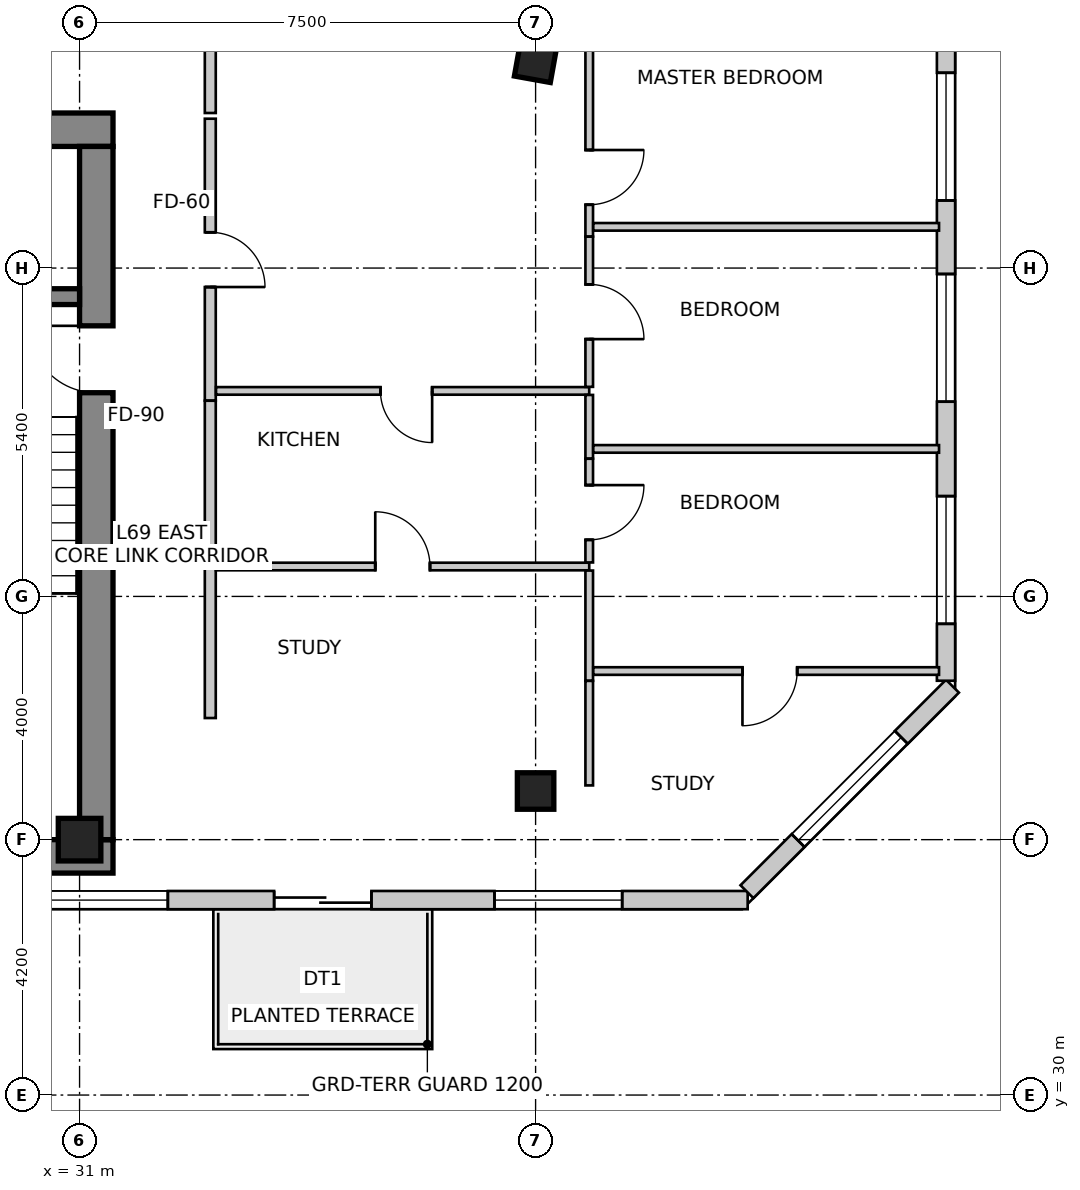
"""IFC4 building model, lengths in metres.
Left out: names, types, materials, properties, quantities, classifications, styles, units other than length and angle.
Written with IfcOpenShell. Run it as: python <this file> out.ifc"""

import sys

from ifc_helpers import new_model, si_unit, direction, frame, frame_2d, origin, origin_2d, place, context, subcontext, project, spatial, rectangle, extrude, source, transform, mapped, element, fill, save


model = new_model("IFC4")
c1 = context("Model", 3, precision=1e-05, world=origin(), true_north=direction((0.0, 1.0)))
c2 = subcontext(c1, "Body", "Model", "MODEL_VIEW")
j1 = project(units=[si_unit("LENGTHUNIT", "METRE"), si_unit("PLANEANGLEUNIT", "RADIAN")], contexts=[c1])
p1 = place(None, origin())
s1 = spatial("IfcSite", under=j1, at=p1, CompositionType="ELEMENT")
p2 = place(p1, origin())
s2 = spatial("IfcBuilding", under=s1, at=p2, CompositionType="ELEMENT")
p3 = place(p2, frame((0.0, 0.0, 270.9)))
s3 = spatial("IfcBuildingStorey", under=s2, at=p3, CompositionType="ELEMENT", Elevation=270.9)
p4 = place(p3, frame((16.05, 45.875, 0.0), z_axis=(0.0, 0.0, 1.0), x_axis=(1.0, 0.0, 0.0)))
e1 = element("IfcWall", 1, at=p4, inside=s3, PredefinedType="SHEAR", context=c2, shape_type="SweptSolid", body=[
    extrude(rectangle(XDim=15.5, YDim=0.55, at=frame_2d((7.75, 0.0))), origin(), (0.0, 0.0, 1.0), 3.6),
])
p5 = place(p3, frame((16.05, 33.925, 0.0), z_axis=(0.0, 0.0, 1.0), x_axis=(1.0, 0.0, 0.0)))
e2 = element("IfcWall", 2, at=p5, inside=s3, PredefinedType="SHEAR", context=c2, shape_type="SweptSolid", body=[
    extrude(rectangle(XDim=15.5, YDim=0.55, at=frame_2d((7.75, 0.0))), origin(), (0.0, 0.0, 1.0), 3.6),
])
m1 = source(origin(), c2, "Body", "SweptSolid", [
    extrude(rectangle(XDim=1.1, YDim=2.15, at=frame_2d((0.55, 1.075))), frame((0.0, 0.285, 0.0), z_axis=(0.0, -1.0, 0.0), x_axis=(1.0, 0.0, 0.0)), (0.0, 0.0, 1.0), 0.57),
])
p6 = place(p5, frame((9.98, 0.0, 0.0)))
e3 = element("IfcOpeningElement", 3, at=p6, cuts=e2, PredefinedType="OPENING", context=c2, shape_type="MappedRepresentation", body=[
    mapped(m1, transform((0.0, 0.0, 0.0), scale=1.0)),
])
p7 = place(p3, frame((31.275, 34.2, 0.0), z_axis=(0.0, 0.0, 1.0), x_axis=(0.0, 1.0, 0.0)))
e4 = element("IfcWall", 4, at=p7, inside=s3, PredefinedType="SHEAR", context=c2, shape_type="SweptSolid", body=[
    extrude(rectangle(XDim=11.4, YDim=0.55, at=frame_2d((5.7, 0.0))), origin(), (0.0, 0.0, 1.0), 3.6),
])
p8 = place(p7, frame((7.35, 0.0, 0.0)))
e5 = element("IfcOpeningElement", 5, at=p8, cuts=e4, PredefinedType="OPENING", context=c2, shape_type="MappedRepresentation", body=[
    mapped(m1, transform((0.0, 0.0, 0.0), scale=1.0)),
])
p9 = place(p3, frame((27.5, 43.13, 0.0), z_axis=(0.0, 0.0, 1.0), x_axis=(1.0, 0.0, 0.0)))
e6 = element("IfcWall", 6, at=p9, inside=s3, PredefinedType="SHEAR", context=c2, shape_type="SweptSolid", body=[
    extrude(rectangle(XDim=3.5, YDim=0.26, at=frame_2d((1.75, 0.0))), origin(), (0.0, 0.0, 1.0), 3.6),
])
m2 = source(origin(), c2, "Body", "SweptSolid", [
    extrude(rectangle(XDim=0.6, YDim=0.6, at=origin_2d()), origin(), (0.0, 0.0, 1.0), 3.6),
])
p10 = place(p3, frame((38.5, 47.0, 0.0), z_axis=(0.0, 0.0, 1.0), x_axis=(0.984195607969, -0.17708474032, 0.0)))
e7 = element("IfcColumn", 7, at=p10, inside=s3, PredefinedType="COLUMN", context=c2, shape_type="MappedRepresentation", body=[
    mapped(m2, transform((0.0, 0.0, 0.0), scale=1.0)),
])
m3 = source(origin(), c2, "Body", "SweptSolid", [
    extrude(rectangle(XDim=0.7, YDim=0.7, at=origin_2d()), origin(), (0.0, 0.0, 1.0), 3.6),
])
p11 = place(p3, frame((31.0, 34.2, 0.0), z_axis=(0.0, 0.0, 1.0), x_axis=(1.0, 0.0, 0.0)))
e8 = element("IfcColumn", 8, at=p11, inside=s3, PredefinedType="COLUMN", context=c2, shape_type="MappedRepresentation", body=[
    mapped(m3, transform((0.0, 0.0, 0.0), scale=1.0)),
])
p12 = place(p3, frame((38.5, 35.0, 0.0), z_axis=(0.0, 0.0, 1.0), x_axis=(1.0, 0.0, 0.0)))
e9 = element("IfcColumn", 9, at=p12, inside=s3, PredefinedType="COLUMN", context=c2, shape_type="MappedRepresentation", body=[
    mapped(m2, transform((0.0, 0.0, 0.0), scale=1.0)),
])
p13 = place(p3, frame((28.565, 33.206, 0.0), z_axis=(0.0, 0.0, 1.0), x_axis=(1.0, 0.0, 0.0)))
e10 = element("IfcWall", 10, at=p13, inside=s3, PredefinedType="SOLIDWALL", context=c2, shape_type="SweptSolid", body=[
    extrude(rectangle(XDim=13.423, YDim=0.3, at=frame_2d((6.711, 0.0))), origin(), (0.0, 0.0, 1.0), 3.35),
])
m4 = source(origin(), c2, "Body", "SweptSolid", [
    extrude(rectangle(XDim=1.6, YDim=2.15, at=frame_2d((0.8, 1.075))), frame((0.0, 0.16, 0.0), z_axis=(0.0, -1.0, 0.0), x_axis=(1.0, 0.0, 0.0)), (0.0, 0.0, 1.0), 0.32),
])
p14 = place(p13, frame((5.635, 0.0, 0.0)))
e11 = element("IfcOpeningElement", 11, at=p14, cuts=e10, PredefinedType="OPENING", context=c2, shape_type="MappedRepresentation", body=[
    mapped(m4, transform((0.0, 0.0, 0.0), scale=1.0)),
])
m5 = source(origin(), c2, "Body", "SweptSolid", [
    extrude(rectangle(XDim=2.1, YDim=2.0, at=frame_2d((1.05, 1.0))), frame((0.0, 0.16, 0.0), z_axis=(0.0, -1.0, 0.0), x_axis=(1.0, 0.0, 0.0)), (0.0, 0.0, 1.0), 0.32),
])
p15 = place(p13, frame((1.787, 0.0, 0.85)))
e12 = element("IfcOpeningElement", 12, at=p15, cuts=e10, PredefinedType="OPENING", context=c2, shape_type="MappedRepresentation", body=[
    mapped(m5, transform((0.0, 0.0, 0.0), scale=1.0)),
])
p16 = place(p13, frame((9.259, 0.0, 0.85)))
e13 = element("IfcOpeningElement", 13, at=p16, cuts=e10, PredefinedType="OPENING", context=c2, shape_type="MappedRepresentation", body=[
    mapped(m5, transform((0.0, 0.0, 0.0), scale=1.0)),
])
p17 = place(p3, frame((41.976, 33.344, 0.0), z_axis=(0.0, 0.0, 1.0), x_axis=(0.707132316343, 0.707081245108, 0.0)))
e14 = element("IfcWall", 14, at=p17, inside=s3, PredefinedType="SOLIDWALL", context=c2, shape_type="SweptSolid", body=[
    extrude(rectangle(XDim=4.78, YDim=0.3, at=frame_2d((2.39, 0.0))), origin(), (0.0, 0.0, 1.0), 3.35),
])
m6 = source(origin(), c2, "Body", "SweptSolid", [
    extrude(rectangle(XDim=2.4, YDim=2.2, at=frame_2d((1.2, 1.1))), frame((0.0, 0.16, 0.0), z_axis=(0.0, -1.0, 0.0), x_axis=(1.0, 0.0, 0.0)), (0.0, 0.0, 1.0), 0.32),
])
p18 = place(p17, frame((1.19, 0.0, 0.85)))
e15 = element("IfcOpeningElement", 15, at=p18, cuts=e14, PredefinedType="OPENING", context=c2, shape_type="MappedRepresentation", body=[
    mapped(m6, transform((0.0, 0.0, 0.0), scale=1.0)),
])
p19 = place(p3, frame((45.25, 36.813, 0.0), z_axis=(0.0, 0.0, 1.0), x_axis=(0.0, 1.0, 0.0)))
e16 = element("IfcWall", 16, at=p19, inside=s3, PredefinedType="SOLIDWALL", context=c2, shape_type="SweptSolid", body=[
    extrude(rectangle(XDim=10.531, YDim=0.3, at=frame_2d((5.265, 0.0))), origin(), (0.0, 0.0, 1.0), 3.35),
])
p20 = place(p19, frame((0.936, 0.0, 0.85)))
e17 = element("IfcOpeningElement", 17, at=p20, cuts=e16, PredefinedType="OPENING", context=c2, shape_type="MappedRepresentation", body=[
    mapped(m5, transform((0.0, 0.0, 0.0), scale=1.0)),
])
p21 = place(p19, frame((4.589, 0.0, 0.85)))
e18 = element("IfcOpeningElement", 18, at=p21, cuts=e16, PredefinedType="OPENING", context=c2, shape_type="MappedRepresentation", body=[
    mapped(m5, transform((0.0, 0.0, 0.0), scale=1.0)),
])
p22 = place(p19, frame((7.898, 0.0, 0.85)))
e19 = element("IfcOpeningElement", 19, at=p22, cuts=e16, PredefinedType="OPENING", context=c2, shape_type="MappedRepresentation", body=[
    mapped(m5, transform((0.0, 0.0, 0.0), scale=1.0)),
])
p23 = place(p3, frame((33.15, 47.606, 0.0), z_axis=(0.0, 0.0, 1.0), x_axis=(0.0, -1.0, 0.0)))
e20 = element("IfcWall", 20, at=p23, inside=s3, PredefinedType="PARTITIONING", context=c2, shape_type="SweptSolid", body=[
    extrude(rectangle(XDim=1.456, YDim=0.18, at=frame_2d((0.728, 0.0))), origin(), (0.0, 0.0, 1.0), 3.35),
])
p24 = place(p3, frame((33.15, 38.852, 0.0), z_axis=(0.0, 0.0, 1.0), x_axis=(0.0, -1.0, 0.0)))
e21 = element("IfcWall", 21, at=p24, inside=s3, PredefinedType="PARTITIONING", context=c2, shape_type="SweptSolid", body=[
    extrude(rectangle(XDim=2.652, YDim=0.18, at=frame_2d((1.326, 0.0))), origin(), (0.0, 0.0, 1.0), 3.35),
])
p25 = place(p3, frame((33.15, 46.056, 0.0), z_axis=(0.0, 0.0, 1.0), x_axis=(0.0, -1.0, 0.0)))
e22 = element("IfcWall", 22, at=p25, inside=s3, PredefinedType="PARTITIONING", context=c2, shape_type="SweptSolid", body=[
    extrude(rectangle(XDim=4.636, YDim=0.18, at=frame_2d((2.318, 0.0))), origin(), (0.0, 0.0, 1.0), 2.788),
])
m7 = source(origin(), c2, "Body", "SweptSolid", [
    extrude(rectangle(XDim=0.9, YDim=2.15, at=frame_2d((0.45, 1.075))), frame((0.0, 0.1, 0.0), z_axis=(0.0, -1.0, 0.0), x_axis=(1.0, 0.0, 0.0)), (0.0, 0.0, 1.0), 0.2),
])
p26 = place(p25, frame((1.868, 0.0, 0.0)))
e23 = element("IfcOpeningElement", 23, at=p26, cuts=e22, PredefinedType="OPENING", context=c2, shape_type="MappedRepresentation", body=[
    mapped(m7, transform((0.0, 0.0, 0.0), scale=1.0)),
])
p27 = place(p3, frame((33.15, 41.418, 0.0), z_axis=(0.0, 0.0, 1.0), x_axis=(0.0, -1.0, 0.0)))
e24 = element("IfcWall", 24, at=p27, inside=s3, PredefinedType="PARTITIONING", context=c2, shape_type="SweptSolid", body=[
    extrude(rectangle(XDim=2.564, YDim=0.18, at=frame_2d((1.282, 0.0))), origin(), (0.0, 0.0, 1.0), 3.35),
])
p28 = place(p3, frame((33.244, 38.692, 0.0), z_axis=(0.0, 0.0, 1.0), x_axis=(1.0, 0.0, 0.0)))
e25 = element("IfcWall", 25, at=p28, inside=s3, PredefinedType="PARTITIONING", context=c2, shape_type="SweptSolid", body=[
    extrude(rectangle(XDim=6.138, YDim=0.125, at=frame_2d((3.069, 0.0))), origin(), (0.0, 0.0, 1.0), 2.935),
])
m8 = source(origin(), c2, "Body", "SweptSolid", [
    extrude(rectangle(XDim=0.9, YDim=2.15, at=frame_2d((0.45, 1.075))), frame((0.0, 0.073, 0.0), z_axis=(0.0, -1.0, 0.0), x_axis=(1.0, 0.0, 0.0)), (0.0, 0.0, 1.0), 0.145),
])
p29 = place(p28, frame((2.619, 0.0, 0.0)))
e26 = element("IfcOpeningElement", 26, at=p29, cuts=e25, PredefinedType="OPENING", context=c2, shape_type="MappedRepresentation", body=[
    mapped(m8, transform((0.0, 0.0, 0.0), scale=1.0)),
])
p30 = place(p3, frame((39.382, 38.625, 0.0), z_axis=(0.0, 0.0, 1.0), x_axis=(0.0, -1.0, 0.0)))
e27 = element("IfcWall", 27, at=p30, inside=s3, PredefinedType="PARTITIONING", context=c2, shape_type="SweptSolid", body=[
    extrude(rectangle(XDim=1.812, YDim=0.125, at=frame_2d((0.906, 0.0))), origin(), (0.0, 0.0, 1.0), 3.35),
])
p31 = place(p3, frame((39.382, 36.811, 0.0), z_axis=(0.0, 0.0, 1.0), x_axis=(0.0, -1.0, 0.0)))
e28 = element("IfcWall", 28, at=p31, inside=s3, PredefinedType="PARTITIONING", context=c2, shape_type="SweptSolid", body=[
    extrude(rectangle(XDim=1.719, YDim=0.125, at=frame_2d((0.859, 0.0))), origin(), (0.0, 0.0, 1.0), 3.35),
])
p32 = place(p3, frame((39.382, 41.58, 0.0), z_axis=(0.0, 0.0, 1.0), x_axis=(-1.0, 0.0, 0.0)))
e29 = element("IfcWall", 29, at=p32, inside=s3, PredefinedType="PARTITIONING", context=c2, shape_type="SweptSolid", body=[
    extrude(rectangle(XDim=6.138, YDim=0.125, at=frame_2d((3.069, 0.0))), origin(), (0.0, 0.0, 1.0), 2.935),
])
m9 = source(origin(), c2, "Body", "SweptSolid", [
    extrude(rectangle(XDim=0.85, YDim=2.15, at=frame_2d((0.425, 1.075))), frame((0.0, 0.073, 0.0), z_axis=(0.0, -1.0, 0.0), x_axis=(1.0, 0.0, 0.0)), (0.0, 0.0, 1.0), 0.145),
])
p33 = place(p32, frame((2.583, 0.0, 0.0)))
e30 = element("IfcOpeningElement", 30, at=p33, cuts=e29, PredefinedType="OPENING", context=c2, shape_type="MappedRepresentation", body=[
    mapped(m9, transform((0.0, 0.0, 0.0), scale=1.0)),
])
p34 = place(p3, frame((39.382, 47.768, 0.0), z_axis=(0.0, 0.0, 1.0), x_axis=(0.0, -1.0, 0.0)))
e31 = element("IfcWall", 31, at=p34, inside=s3, PredefinedType="PARTITIONING", context=c2, shape_type="SweptSolid", body=[
    extrude(rectangle(XDim=3.65, YDim=0.125, at=frame_2d((1.825, 0.0))), origin(), (0.0, 0.0, 1.0), 3.35),
])
p35 = place(p34, frame((2.227, 0.0, 0.0)))
e32 = element("IfcOpeningElement", 32, at=p35, cuts=e31, PredefinedType="OPENING", context=c2, shape_type="MappedRepresentation", body=[
    mapped(m8, transform((0.0, 0.0, 0.0), scale=1.0)),
])
p36 = place(p3, frame((39.382, 44.116, 0.0), z_axis=(0.0, 0.0, 1.0), x_axis=(0.0, -1.0, 0.0)))
e33 = element("IfcWall", 33, at=p36, inside=s3, PredefinedType="PARTITIONING", context=c2, shape_type="SweptSolid", body=[
    extrude(rectangle(XDim=2.469, YDim=0.125, at=frame_2d((1.235, 0.0))), origin(), (0.0, 0.0, 1.0), 3.35),
])
p37 = place(p36, frame((0.785, 0.0, 0.0)))
e34 = element("IfcOpeningElement", 34, at=p37, cuts=e33, PredefinedType="OPENING", context=c2, shape_type="MappedRepresentation", body=[
    mapped(m8, transform((0.0, 0.0, 0.0), scale=1.0)),
])
p38 = place(p3, frame((39.382, 41.513, 0.0), z_axis=(0.0, 0.0, 1.0), x_axis=(0.0, -1.0, 0.0)))
e35 = element("IfcWall", 35, at=p38, inside=s3, PredefinedType="PARTITIONING", context=c2, shape_type="SweptSolid", body=[
    extrude(rectangle(XDim=1.047, YDim=0.125, at=frame_2d((0.524, 0.0))), origin(), (0.0, 0.0, 1.0), 3.35),
])
p39 = place(p3, frame((39.382, 40.464, 0.0), z_axis=(0.0, 0.0, 1.0), x_axis=(0.0, -1.0, 0.0)))
e36 = element("IfcWall", 36, at=p39, inside=s3, PredefinedType="PARTITIONING", context=c2, shape_type="SweptSolid", body=[
    extrude(rectangle(XDim=1.706, YDim=0.125, at=frame_2d((0.853, 0.0))), origin(), (0.0, 0.0, 1.0), 3.35),
])
p40 = place(p39, frame((0.433, 0.0, 0.0)))
e37 = element("IfcOpeningElement", 37, at=p40, cuts=e36, PredefinedType="OPENING", context=c2, shape_type="MappedRepresentation", body=[
    mapped(m8, transform((0.0, 0.0, 0.0), scale=1.0)),
])
for number, where, z_axis, x_axis in (
    (38, (45.135, 44.278, 0.0), (0.0, 0.0, 1.0), (-1.0, 0.0, 0.0)),
    (39, (45.135, 40.626, 0.0), (0.0, 0.0, 1.0), (-1.0, 0.0, 0.0)),
):
    element("IfcWall", number, at=place(p3, frame(where, z_axis=z_axis, x_axis=x_axis)), inside=s3, PredefinedType="PARTITIONING", context=c2, shape_type="SweptSolid", body=[
        extrude(rectangle(XDim=5.687, YDim=0.125, at=frame_2d((2.843, 0.0))), origin(), (0.0, 0.0, 1.0), 3.35),
    ])
p41 = place(p3, frame((45.135, 36.973, 0.0), z_axis=(0.0, 0.0, 1.0), x_axis=(-1.0, 0.0, 0.0)))
e40 = element("IfcWall", 40, at=p41, inside=s3, PredefinedType="PARTITIONING", context=c2, shape_type="SweptSolid", body=[
    extrude(rectangle(XDim=5.687, YDim=0.125, at=frame_2d((2.843, 0.0))), origin(), (0.0, 0.0, 1.0), 3.35),
])
p42 = place(p41, frame((2.333, 0.0, 0.0)))
e41 = element("IfcOpeningElement", 41, at=p42, cuts=e40, PredefinedType="OPENING", context=c2, shape_type="MappedRepresentation", body=[
    mapped(m8, transform((0.0, 0.0, 0.0), scale=1.0)),
])
m10 = source(origin(), c2, "Body", "SweptSolid", [
    extrude(rectangle(XDim=1.6, YDim=2.15, at=frame_2d((0.8, 1.075))), frame((0.0, 0.025, 0.0), z_axis=(0.0, -1.0, 0.0), x_axis=(1.0, 0.0, 0.0)), (0.0, 0.0, 1.0), 0.05),
])
p43 = place(p14, origin())
e42 = element("IfcDoor", 42, at=p43, inside=s3, OperationType="DOUBLE_DOOR_SLIDING", PredefinedType="DOOR", context=c2, shape_type="MappedRepresentation", body=[
    mapped(m10, transform((0.0, 0.0, 0.0), scale=1.0)),
])
fill(e11, e42)
m11 = source(origin(), c2, "Body", "SweptSolid", [
    extrude(rectangle(XDim=2.1, YDim=2.0, at=frame_2d((1.05, 1.0))), frame((0.0, -0.015, 0.0), z_axis=(0.0, -1.0, 0.0), x_axis=(1.0, 0.0, 0.0)), (0.0, 0.0, 1.0), 0.06),
])
p44 = place(p15, origin())
e43 = element("IfcWindow", 43, at=p44, inside=s3, PartitioningType="SINGLE_PANEL", PredefinedType="WINDOW", context=c2, shape_type="MappedRepresentation", body=[
    mapped(m11, transform((0.0, 0.0, 0.0), scale=1.0)),
])
fill(e12, e43)
p45 = place(p16, origin())
e44 = element("IfcWindow", 44, at=p45, inside=s3, PartitioningType="SINGLE_PANEL", PredefinedType="WINDOW", context=c2, shape_type="MappedRepresentation", body=[
    mapped(m11, transform((0.0, 0.0, 0.0), scale=1.0)),
])
fill(e13, e44)
m12 = source(origin(), c2, "Body", "SweptSolid", [
    extrude(rectangle(XDim=2.4, YDim=2.2, at=frame_2d((1.2, 1.1))), frame((0.0, -0.015, 0.0), z_axis=(0.0, -1.0, 0.0), x_axis=(1.0, 0.0, 0.0)), (0.0, 0.0, 1.0), 0.06),
])
p46 = place(p18, origin())
e45 = element("IfcWindow", 45, at=p46, inside=s3, PartitioningType="SINGLE_PANEL", PredefinedType="WINDOW", context=c2, shape_type="MappedRepresentation", body=[
    mapped(m12, transform((0.0, 0.0, 0.0), scale=1.0)),
])
fill(e15, e45)
p47 = place(p20, origin())
e46 = element("IfcWindow", 46, at=p47, inside=s3, PartitioningType="SINGLE_PANEL", PredefinedType="WINDOW", context=c2, shape_type="MappedRepresentation", body=[
    mapped(m11, transform((0.0, 0.0, 0.0), scale=1.0)),
])
fill(e17, e46)
p48 = place(p21, origin())
e47 = element("IfcWindow", 47, at=p48, inside=s3, PartitioningType="SINGLE_PANEL", PredefinedType="WINDOW", context=c2, shape_type="MappedRepresentation", body=[
    mapped(m11, transform((0.0, 0.0, 0.0), scale=1.0)),
])
fill(e18, e47)
p49 = place(p22, origin())
e48 = element("IfcWindow", 48, at=p49, inside=s3, PartitioningType="SINGLE_PANEL", PredefinedType="WINDOW", context=c2, shape_type="MappedRepresentation", body=[
    mapped(m11, transform((0.0, 0.0, 0.0), scale=1.0)),
])
fill(e19, e48)
m13 = source(origin(), c2, "Body", "SweptSolid", [
    extrude(rectangle(XDim=1.1, YDim=2.15, at=frame_2d((0.55, 1.075))), frame((0.0, 0.025, 0.0), z_axis=(0.0, -1.0, 0.0), x_axis=(1.0, 0.0, 0.0)), (0.0, 0.0, 1.0), 0.05),
])
p50 = place(p8, origin())
e49 = element("IfcDoor", 49, at=p50, inside=s3, OperationType="SINGLE_SWING_RIGHT", PredefinedType="DOOR", context=c2, shape_type="MappedRepresentation", body=[
    mapped(m13, transform((0.0, 0.0, 0.0), scale=1.0)),
])
fill(e5, e49)
m14 = source(origin(), c2, "Body", "SweptSolid", [
    extrude(rectangle(XDim=0.9, YDim=2.15, at=frame_2d((0.45, 1.075))), frame((0.0, 0.025, 0.0), z_axis=(0.0, -1.0, 0.0), x_axis=(1.0, 0.0, 0.0)), (0.0, 0.0, 1.0), 0.05),
])
p51 = place(p29, origin())
e50 = element("IfcDoor", 50, at=p51, inside=s3, OperationType="SINGLE_SWING_LEFT", PredefinedType="DOOR", context=c2, shape_type="MappedRepresentation", body=[
    mapped(m14, transform((0.0, 0.0, 0.0), scale=1.0)),
])
fill(e26, e50)
m15 = source(origin(), c2, "Body", "SweptSolid", [
    extrude(rectangle(XDim=0.9, YDim=2.15, at=frame_2d((0.45, 1.075))), frame((0.0, 0.025, 0.0), z_axis=(0.0, -1.0, 0.0), x_axis=(1.0, 0.0, 0.0)), (0.0, 0.0, 1.0), 0.05),
])
p52 = place(p26, origin())
e51 = element("IfcDoor", 51, at=p52, inside=s3, OperationType="SINGLE_SWING_RIGHT", PredefinedType="DOOR", context=c2, shape_type="MappedRepresentation", body=[
    mapped(m15, transform((0.0, 0.0, 0.0), scale=1.0)),
])
fill(e23, e51)
m16 = source(origin(), c2, "Body", "SweptSolid", [
    extrude(rectangle(XDim=0.85, YDim=2.15, at=frame_2d((0.425, 1.075))), frame((0.0, 0.025, 0.0), z_axis=(0.0, -1.0, 0.0), x_axis=(1.0, 0.0, 0.0)), (0.0, 0.0, 1.0), 0.05),
])
p53 = place(p33, origin())
e52 = element("IfcDoor", 52, at=p53, inside=s3, OperationType="SINGLE_SWING_LEFT", PredefinedType="DOOR", context=c2, shape_type="MappedRepresentation", body=[
    mapped(m16, transform((0.0, 0.0, 0.0), scale=1.0)),
])
fill(e30, e52)
p54 = place(p35, origin())
e53 = element("IfcDoor", 53, at=p54, inside=s3, OperationType="SINGLE_SWING_LEFT", PredefinedType="DOOR", context=c2, shape_type="MappedRepresentation", body=[
    mapped(m14, transform((0.0, 0.0, 0.0), scale=1.0)),
])
fill(e32, e53)
p55 = place(p37, origin())
e54 = element("IfcDoor", 54, at=p55, inside=s3, OperationType="SINGLE_SWING_RIGHT", PredefinedType="DOOR", context=c2, shape_type="MappedRepresentation", body=[
    mapped(m14, transform((0.0, 0.0, 0.0), scale=1.0)),
])
fill(e34, e54)
p56 = place(p40, origin())
e55 = element("IfcDoor", 55, at=p56, inside=s3, OperationType="SINGLE_SWING_LEFT", PredefinedType="DOOR", context=c2, shape_type="MappedRepresentation", body=[
    mapped(m14, transform((0.0, 0.0, 0.0), scale=1.0)),
])
fill(e37, e55)
p57 = place(p42, origin())
e56 = element("IfcDoor", 56, at=p57, inside=s3, OperationType="SINGLE_SWING_RIGHT", PredefinedType="DOOR", context=c2, shape_type="MappedRepresentation", body=[
    mapped(m14, transform((0.0, 0.0, 0.0), scale=1.0)),
])
fill(e41, e56)
save(model, sys.argv[1])
